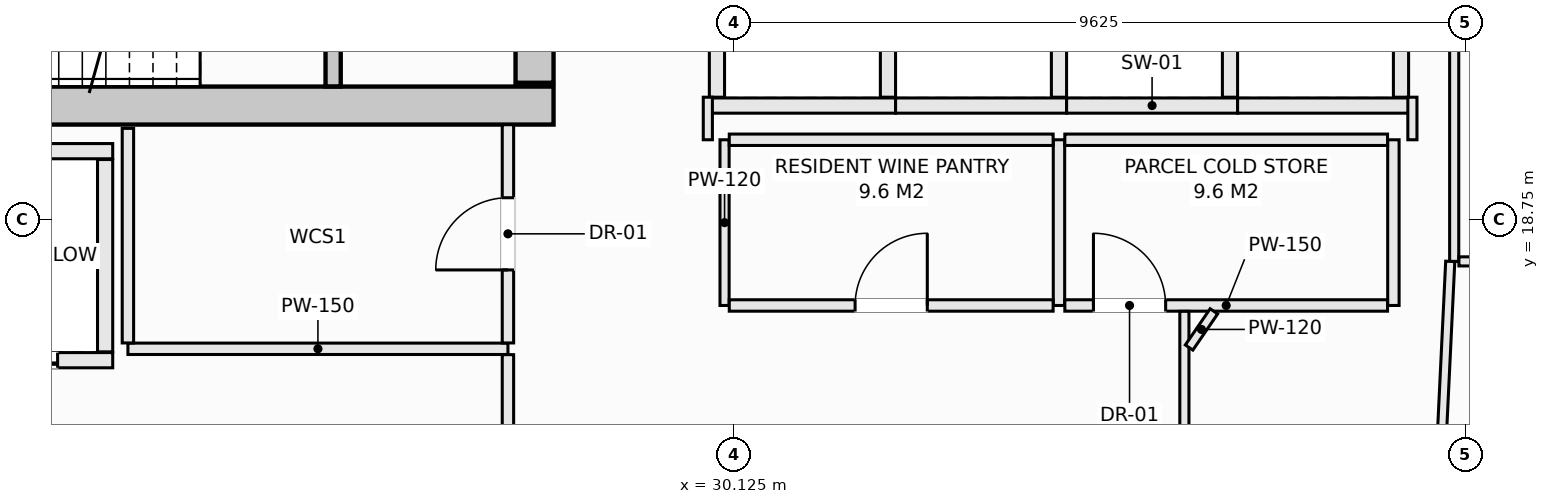
"""IFC4 building model, lengths in metres.
Left out: names, types, materials, properties, quantities, classifications, styles, units other than length and angle.
Written with IfcOpenShell. Run it as: python <this file> out.ifc"""

import sys

from ifc_helpers import new_model, si_unit, direction, frame, frame_2d, origin, place, context, subcontext, project, spatial, rectangle, extrude, element, fill, save


model = new_model("IFC4")
c1 = context("Model", 3, precision=1e-05, world=origin(), true_north=direction((0.0, 1.0)))
c2 = subcontext(c1, "Body", "Model", "MODEL_VIEW")
j1 = project(units=[si_unit("LENGTHUNIT", "METRE"), si_unit("PLANEANGLEUNIT", "RADIAN")], contexts=[c1])
p1 = place(None, origin())
s1 = spatial("IfcSite", under=j1, at=p1, CompositionType="ELEMENT")
p2 = place(p1, origin())
s2 = spatial("IfcBuilding", under=s1, at=p2, CompositionType="ELEMENT")
p3 = place(p2, frame((0.0, 0.0, 239.3)))
s3 = spatial("IfcBuildingStorey", under=s2, at=p3, CompositionType="ELEMENT", Elevation=239.3)
p4 = place(p3, frame((14.25, 20.25, -0.27), z_axis=(0.0, 0.0, 1.0), x_axis=(1.0, 0.0, 0.0)))
e1 = element("IfcWall", 1, at=p4, inside=s3, PredefinedType="SHEAR", context=c2, shape_type="SweptSolid", body=[
    extrude(rectangle(XDim=13.5, YDim=0.5, at=frame_2d((6.75, 0.0))), origin(), (0.0, 0.0, 1.0), 3.3),
])
p5 = place(p3, frame((27.5, 20.55, -0.27), z_axis=(0.0, 0.0, 1.0), x_axis=(0.0, 1.0, 0.0)))
e2 = element("IfcWall", 2, at=p5, inside=s3, PredefinedType="SHEAR", context=c2, shape_type="SweptSolid", body=[
    extrude(rectangle(XDim=1.5, YDim=0.5, at=frame_2d((0.75, 0.0))), origin(), (0.0, 0.0, 1.0), 3.3),
])
p6 = place(p3, frame((24.85, 20.502, -0.27), z_axis=(0.0, 0.0, 1.0), x_axis=(0.0, 1.0, 0.0)))
e3 = element("IfcWall", 3, at=p6, inside=s3, PredefinedType="SHEAR", context=c2, shape_type="SweptSolid", body=[
    extrude(rectangle(XDim=3.038, YDim=0.2, at=frame_2d((1.519, 0.0))), origin(), (0.0, 0.0, 1.0), 3.3),
])
p7 = place(p6, frame((0.969, 0.0, 0.27)))
e4 = element("IfcOpeningElement", 4, at=p7, cuts=e3, PredefinedType="OPENING", context=c2, shape_type="SweptSolid", body=[
    extrude(rectangle(XDim=1.1, YDim=2.15, at=frame_2d((0.55, 1.075))), frame((0.0, 0.11, 0.0), z_axis=(0.0, -1.0, 0.0), x_axis=(1.0, 0.0, 0.0)), (0.0, 0.0, 1.0), 0.22),
])
p8 = place(p3, frame((19.4, 19.65, 0.0), z_axis=(0.0, 0.0, 1.0), x_axis=(1.0, 0.0, 0.0)))
e5 = element("IfcWall", 5, at=p8, inside=s3, PredefinedType="SOLIDWALL", context=c2, shape_type="SweptSolid", body=[
    extrude(rectangle(XDim=2.55, YDim=0.2, at=frame_2d((1.275, 0.0))), origin(), (0.0, 0.0, 1.0), 3.03),
])
p9 = place(p3, frame((19.4, 16.9, 0.0), z_axis=(0.0, 0.0, 1.0), x_axis=(1.0, 0.0, 0.0)))
e6 = element("IfcWall", 6, at=p9, inside=s3, PredefinedType="SOLIDWALL", context=c2, shape_type="SweptSolid", body=[
    extrude(rectangle(XDim=2.55, YDim=0.2, at=frame_2d((1.275, 0.0))), origin(), (0.0, 0.0, 1.0), 3.03),
])
p10 = place(p9, frame((0.725, 0.0, 0.0)))
e7 = element("IfcOpeningElement", 7, at=p10, cuts=e6, PredefinedType="OPENING", context=c2, shape_type="SweptSolid", body=[
    extrude(rectangle(XDim=1.1, YDim=2.2, at=frame_2d((0.55, 1.1))), frame((0.0, 0.11, 0.0), z_axis=(0.0, -1.0, 0.0), x_axis=(1.0, 0.0, 0.0)), (0.0, 0.0, 1.0), 0.22),
])
p11 = place(p3, frame((21.85, 17.01, 0.0), z_axis=(0.0, 0.0, 1.0), x_axis=(0.0, 1.0, 0.0)))
e8 = element("IfcWall", 8, at=p11, inside=s3, PredefinedType="SOLIDWALL", context=c2, shape_type="SweptSolid", body=[
    extrude(rectangle(XDim=2.53, YDim=0.2, at=frame_2d((1.265, 0.0))), origin(), (0.0, 0.0, 1.0), 3.03),
])
p12 = place(p3, frame((29.8, 20.25, 0.0), z_axis=(0.0, 0.0, 1.0), x_axis=(1.0, 0.0, 0.0)))
e9 = element("IfcWall", 9, at=p12, inside=s3, PredefinedType="SOLIDWALL", context=c2, shape_type="SweptSolid", body=[
    extrude(rectangle(XDim=2.45, YDim=0.2, at=frame_2d((1.225, 0.0))), origin(), (0.0, 0.0, 1.0), 3.03),
])
for number, where, z_axis, x_axis in (
    (10, (29.9, 20.36, 0.0), (0.0, 0.0, 1.0), (0.0, 1.0, 0.0)),
    (11, (32.15, 20.36, 0.0), (0.0, 0.0, 1.0), (0.0, 1.0, 0.0)),
):
    element("IfcWall", number, at=place(p3, frame(where, z_axis=z_axis, x_axis=x_axis)), inside=s3, PredefinedType="SOLIDWALL", context=c2, shape_type="SweptSolid", body=[
        extrude(rectangle(XDim=2.43, YDim=0.2, at=frame_2d((1.215, 0.0))), origin(), (0.0, 0.0, 1.0), 3.03),
    ])
p13 = place(p3, frame((32.25, 20.25, 0.0), z_axis=(0.0, 0.0, 1.0), x_axis=(1.0, 0.0, 0.0)))
e12 = element("IfcWall", 12, at=p13, inside=s3, PredefinedType="SOLIDWALL", context=c2, shape_type="SweptSolid", body=[
    extrude(rectangle(XDim=2.25, YDim=0.2, at=frame_2d((1.125, 0.0))), origin(), (0.0, 0.0, 1.0), 3.03),
])
p14 = place(p3, frame((34.4, 20.36, 0.0), z_axis=(0.0, 0.0, 1.0), x_axis=(0.0, 1.0, 0.0)))
e13 = element("IfcWall", 13, at=p14, inside=s3, PredefinedType="SOLIDWALL", context=c2, shape_type="SweptSolid", body=[
    extrude(rectangle(XDim=2.43, YDim=0.2, at=frame_2d((1.215, 0.0))), origin(), (0.0, 0.0, 1.0), 3.03),
])
p15 = place(p3, frame((34.5, 20.25, 0.0), z_axis=(0.0, 0.0, 1.0), x_axis=(1.0, 0.0, 0.0)))
e14 = element("IfcWall", 14, at=p15, inside=s3, PredefinedType="SOLIDWALL", context=c2, shape_type="SweptSolid", body=[
    extrude(rectangle(XDim=2.25, YDim=0.2, at=frame_2d((1.125, 0.0))), origin(), (0.0, 0.0, 1.0), 3.03),
])
p16 = place(p3, frame((36.65, 20.36, 0.0), z_axis=(0.0, 0.0, 1.0), x_axis=(0.0, 1.0, 0.0)))
e15 = element("IfcWall", 15, at=p16, inside=s3, PredefinedType="SOLIDWALL", context=c2, shape_type="SweptSolid", body=[
    extrude(rectangle(XDim=2.43, YDim=0.2, at=frame_2d((1.215, 0.0))), origin(), (0.0, 0.0, 1.0), 3.03),
])
p17 = place(p3, frame((36.75, 20.25, 0.0), z_axis=(0.0, 0.0, 1.0), x_axis=(1.0, 0.0, 0.0)))
e16 = element("IfcWall", 16, at=p17, inside=s3, PredefinedType="SOLIDWALL", context=c2, shape_type="SweptSolid", body=[
    extrude(rectangle(XDim=2.25, YDim=0.2, at=frame_2d((1.125, 0.0))), origin(), (0.0, 0.0, 1.0), 3.03),
])
p18 = place(p3, frame((38.9, 20.36, 0.0), z_axis=(0.0, 0.0, 1.0), x_axis=(0.0, 1.0, 0.0)))
e17 = element("IfcWall", 17, at=p18, inside=s3, PredefinedType="SOLIDWALL", context=c2, shape_type="SweptSolid", body=[
    extrude(rectangle(XDim=2.43, YDim=0.2, at=frame_2d((1.215, 0.0))), origin(), (0.0, 0.0, 1.0), 3.03),
])
p19 = place(p3, frame((22.15, 17.05, 0.0), z_axis=(0.0, 0.0, 1.0), x_axis=(1.0, 0.0, 0.0)))
e18 = element("IfcWall", 18, at=p19, inside=s3, PredefinedType="PARTITIONING", context=c2, shape_type="SweptSolid", body=[
    extrude(rectangle(XDim=5.0, YDim=0.15, at=frame_2d((2.5, 0.0))), origin(), (0.0, 0.0, 1.0), 3.03),
])
p20 = place(p3, frame((22.15, 17.127, 0.0), z_axis=(0.0, 0.0, 1.0), x_axis=(0.0, 1.0, 0.0)))
e19 = element("IfcWall", 19, at=p20, inside=s3, PredefinedType="PARTITIONING", context=c2, shape_type="SweptSolid", body=[
    extrude(rectangle(XDim=2.823, YDim=0.15, at=frame_2d((1.412, 0.0))), origin(), (0.0, 0.0, 1.0), 3.03),
])
p21 = place(p3, frame((27.15, 11.75, 0.0), z_axis=(0.0, 0.0, 1.0), x_axis=(0.0, 1.0, 0.0)))
e20 = element("IfcWall", 20, at=p21, inside=s3, PredefinedType="PARTITIONING", context=c2, shape_type="SweptSolid", body=[
    extrude(rectangle(XDim=5.223, YDim=0.15, at=frame_2d((2.611, 0.0))), origin(), (0.0, 0.0, 1.0), 3.03),
])
p22 = place(p21, frame((2.912, 0.0, 0.0)))
e21 = element("IfcOpeningElement", 21, at=p22, cuts=e20, PredefinedType="OPENING", context=c2, shape_type="SweptSolid", body=[
    extrude(rectangle(XDim=0.95, YDim=2.1, at=frame_2d((0.475, 1.05))), frame((0.0, 0.085, 0.0), z_axis=(0.0, -1.0, 0.0), x_axis=(1.0, 0.0, 0.0)), (0.0, 0.0, 1.0), 0.17),
])
p23 = place(p3, frame((27.15, 17.127, 0.0), z_axis=(0.0, 0.0, 1.0), x_axis=(0.0, 1.0, 0.0)))
e22 = element("IfcWall", 22, at=p23, inside=s3, PredefinedType="PARTITIONING", context=c2, shape_type="SweptSolid", body=[
    extrude(rectangle(XDim=2.871, YDim=0.15, at=frame_2d((1.436, 0.0))), origin(), (0.0, 0.0, 1.0), 3.03),
])
p24 = place(p23, frame((0.96, 0.0, 0.0)))
e23 = element("IfcOpeningElement", 23, at=p24, cuts=e22, PredefinedType="OPENING", context=c2, shape_type="SweptSolid", body=[
    extrude(rectangle(XDim=0.95, YDim=2.1, at=frame_2d((0.475, 1.05))), frame((0.0, 0.085, 0.0), z_axis=(0.0, -1.0, 0.0), x_axis=(1.0, 0.0, 0.0)), (0.0, 0.0, 1.0), 0.17),
])
p25 = place(p3, frame((30.0, 17.62, 0.0), z_axis=(0.0, 0.0, 1.0), x_axis=(0.0, 1.0, 0.0)))
e24 = element("IfcWall", 24, at=p25, inside=s3, PredefinedType="PARTITIONING", context=c2, shape_type="SweptSolid", body=[
    extrude(rectangle(XDim=2.18, YDim=0.12, at=frame_2d((1.09, 0.0))), origin(), (0.0, 0.0, 1.0), 3.03),
])
for number, where, z_axis, x_axis in (
    (25, (38.8, 17.62, 0.0), (0.0, 0.0, 1.0), (0.0, 1.0, 0.0)),
    (26, (34.4, 17.62, 0.0), (0.0, 0.0, 1.0), (0.0, 1.0, 0.0)),
):
    element("IfcWall", number, at=place(p3, frame(where, z_axis=z_axis, x_axis=x_axis)), inside=s3, PredefinedType="PARTITIONING", context=c2, shape_type="SweptSolid", body=[
        extrude(rectangle(XDim=2.18, YDim=0.15, at=frame_2d((1.09, 0.0))), origin(), (0.0, 0.0, 1.0), 3.03),
    ])
p26 = place(p3, frame((30.062, 17.62, 0.0), z_axis=(0.0, 0.0, 1.0), x_axis=(1.0, 0.0, 0.0)))
e27 = element("IfcWall", 27, at=p26, inside=s3, PredefinedType="PARTITIONING", context=c2, shape_type="SweptSolid", body=[
    extrude(rectangle(XDim=4.261, YDim=0.15, at=frame_2d((2.13, 0.0))), origin(), (0.0, 0.0, 1.0), 3.03),
])
p27 = place(p26, frame((1.656, 0.0, 0.0)))
e28 = element("IfcOpeningElement", 28, at=p27, cuts=e27, PredefinedType="OPENING", context=c2, shape_type="SweptSolid", body=[
    extrude(rectangle(XDim=0.95, YDim=2.1, at=frame_2d((0.475, 1.05))), frame((0.0, 0.085, 0.0), z_axis=(0.0, -1.0, 0.0), x_axis=(1.0, 0.0, 0.0)), (0.0, 0.0, 1.0), 0.17),
])
p28 = place(p3, frame((34.477, 17.62, 0.0), z_axis=(0.0, 0.0, 1.0), x_axis=(1.0, 0.0, 0.0)))
e29 = element("IfcWall", 29, at=p28, inside=s3, PredefinedType="PARTITIONING", context=c2, shape_type="SweptSolid", body=[
    extrude(rectangle(XDim=4.246, YDim=0.15, at=frame_2d((2.123, 0.0))), origin(), (0.0, 0.0, 1.0), 3.03),
])
p29 = place(p28, frame((0.376, 0.0, 0.0)))
e30 = element("IfcOpeningElement", 30, at=p29, cuts=e29, PredefinedType="OPENING", context=c2, shape_type="SweptSolid", body=[
    extrude(rectangle(XDim=0.95, YDim=2.1, at=frame_2d((0.475, 1.05))), frame((0.0, 0.085, 0.0), z_axis=(0.0, -1.0, 0.0), x_axis=(1.0, 0.0, 0.0)), (0.0, 0.0, 1.0), 0.17),
])
p30 = place(p3, frame((30.062, 19.8, 0.0), z_axis=(0.0, 0.0, 1.0), x_axis=(1.0, 0.0, 0.0)))
e31 = element("IfcWall", 31, at=p30, inside=s3, PredefinedType="PARTITIONING", context=c2, shape_type="SweptSolid", body=[
    extrude(rectangle(XDim=4.261, YDim=0.15, at=frame_2d((2.13, 0.0))), origin(), (0.0, 0.0, 1.0), 3.03),
])
p31 = place(p3, frame((34.477, 19.8, 0.0), z_axis=(0.0, 0.0, 1.0), x_axis=(1.0, 0.0, 0.0)))
e32 = element("IfcWall", 32, at=p31, inside=s3, PredefinedType="PARTITIONING", context=c2, shape_type="SweptSolid", body=[
    extrude(rectangle(XDim=4.246, YDim=0.15, at=frame_2d((2.123, 0.0))), origin(), (0.0, 0.0, 1.0), 3.03),
])
p32 = place(p3, frame((39.05, 19.8, 0.0), z_axis=(0.0, 0.0, 1.0), x_axis=(0.0, 1.0, 0.0)))
e33 = element("IfcWall", 33, at=p32, inside=s3, PredefinedType="PARTITIONING", context=c2, shape_type="SweptSolid", body=[
    extrude(rectangle(XDim=0.56, YDim=0.12, at=frame_2d((0.28, 0.0))), origin(), (0.0, 0.0, 1.0), 3.03),
])
p33 = place(p3, frame((39.6, 18.2, 0.0), z_axis=(0.0, 0.0, 1.0), x_axis=(0.0, 1.0, 0.0)))
e34 = element("IfcWall", 34, at=p33, inside=s3, PredefinedType="PARTITIONING", context=c2, shape_type="SweptSolid", body=[
    extrude(rectangle(XDim=4.82, YDim=0.12, at=frame_2d((2.41, 0.0))), origin(), (0.0, 0.0, 1.0), 3.03),
])
p34 = place(p3, frame((39.662, 18.2, 0.0), z_axis=(0.0, 0.0, 1.0), x_axis=(1.0, 0.0, 0.0)))
e35 = element("IfcWall", 35, at=p34, inside=s3, PredefinedType="PARTITIONING", context=c2, shape_type="SweptSolid", body=[
    extrude(rectangle(XDim=1.796, YDim=0.12, at=frame_2d((0.898, 0.0))), origin(), (0.0, 0.0, 1.0), 2.77),
])
p35 = place(p3, frame((29.78, 19.8, 0.0), z_axis=(0.0, 0.0, 1.0), x_axis=(0.0, 1.0, 0.0)))
e36 = element("IfcWall", 36, at=p35, inside=s3, PredefinedType="PARTITIONING", context=c2, shape_type="SweptSolid", body=[
    extrude(rectangle(XDim=0.56, YDim=0.12, at=frame_2d((0.28, 0.0))), origin(), (0.0, 0.0, 1.0), 3.03),
])
p36 = place(p3, frame((36.05, 14.95, 0.0), z_axis=(0.0, 0.0, 1.0), x_axis=(0.0, 1.0, 0.0)))
e37 = element("IfcWall", 37, at=p36, inside=s3, PredefinedType="PARTITIONING", context=c2, shape_type="SweptSolid", body=[
    extrude(rectangle(XDim=2.593, YDim=0.12, at=frame_2d((1.296, 0.0))), origin(), (0.0, 0.0, 1.0), 3.03),
])
p37 = place(p3, frame((36.112, 17.067, 0.0), z_axis=(0.0, 0.0, 1.0), x_axis=(0.565487257316, 0.824757031987, 0.0)))
e38 = element("IfcWall", 38, at=p37, inside=s3, PredefinedType="PARTITIONING", context=c2, shape_type="SweptSolid", body=[
    extrude(rectangle(XDim=0.577, YDim=0.12, at=frame_2d((0.289, 0.0))), origin(), (0.0, 0.0, 1.0), 3.03),
])
p38 = place(p3, frame((39.195, 10.849, 0.0), z_axis=(0.0, 0.0, 1.0), x_axis=(0.048036414601, 0.998845585099, 0.0)))
e39 = element("IfcWall", 39, at=p38, inside=s3, PredefinedType="PARTITIONING", context=c2, shape_type="SweptSolid", body=[
    extrude(rectangle(XDim=7.359, YDim=0.12, at=frame_2d((3.68, 0.0))), origin(), (0.0, 0.0, 1.0), 2.478),
])
p39 = place(p10, origin())
e40 = element("IfcDoor", 40, at=p39, inside=s3, OperationType="SLIDING_TO_LEFT", PredefinedType="DOOR", context=c2, shape_type="SweptSolid", body=[
    extrude(rectangle(XDim=1.1, YDim=2.2, at=frame_2d((0.55, 1.1))), frame((0.0, 0.025, 0.0), z_axis=(0.0, -1.0, 0.0), x_axis=(1.0, 0.0, 0.0)), (0.0, 0.0, 1.0), 0.05),
])
fill(e7, e40)
p40 = place(p24, origin())
e41 = element("IfcDoor", 41, at=p40, inside=s3, OperationType="SINGLE_SWING_LEFT", PredefinedType="DOOR", context=c2, shape_type="SweptSolid", body=[
    extrude(rectangle(XDim=0.95, YDim=2.1, at=frame_2d((0.475, 1.05))), frame((0.0, 0.025, 0.0), z_axis=(0.0, -1.0, 0.0), x_axis=(1.0, 0.0, 0.0)), (0.0, 0.0, 1.0), 0.05),
])
fill(e23, e41)
p41 = place(p27, origin())
e42 = element("IfcDoor", 42, at=p41, inside=s3, OperationType="SINGLE_SWING_RIGHT", PredefinedType="DOOR", context=c2, shape_type="SweptSolid", body=[
    extrude(rectangle(XDim=0.95, YDim=2.1, at=frame_2d((0.475, 1.05))), frame((0.0, 0.025, 0.0), z_axis=(0.0, -1.0, 0.0), x_axis=(1.0, 0.0, 0.0)), (0.0, 0.0, 1.0), 0.05),
])
fill(e28, e42)
p42 = place(p29, origin())
e43 = element("IfcDoor", 43, at=p42, inside=s3, OperationType="SINGLE_SWING_LEFT", PredefinedType="DOOR", context=c2, shape_type="SweptSolid", body=[
    extrude(rectangle(XDim=0.95, YDim=2.1, at=frame_2d((0.475, 1.05))), frame((0.0, 0.025, 0.0), z_axis=(0.0, -1.0, 0.0), x_axis=(1.0, 0.0, 0.0)), (0.0, 0.0, 1.0), 0.05),
])
fill(e30, e43)
save(model, sys.argv[1])
